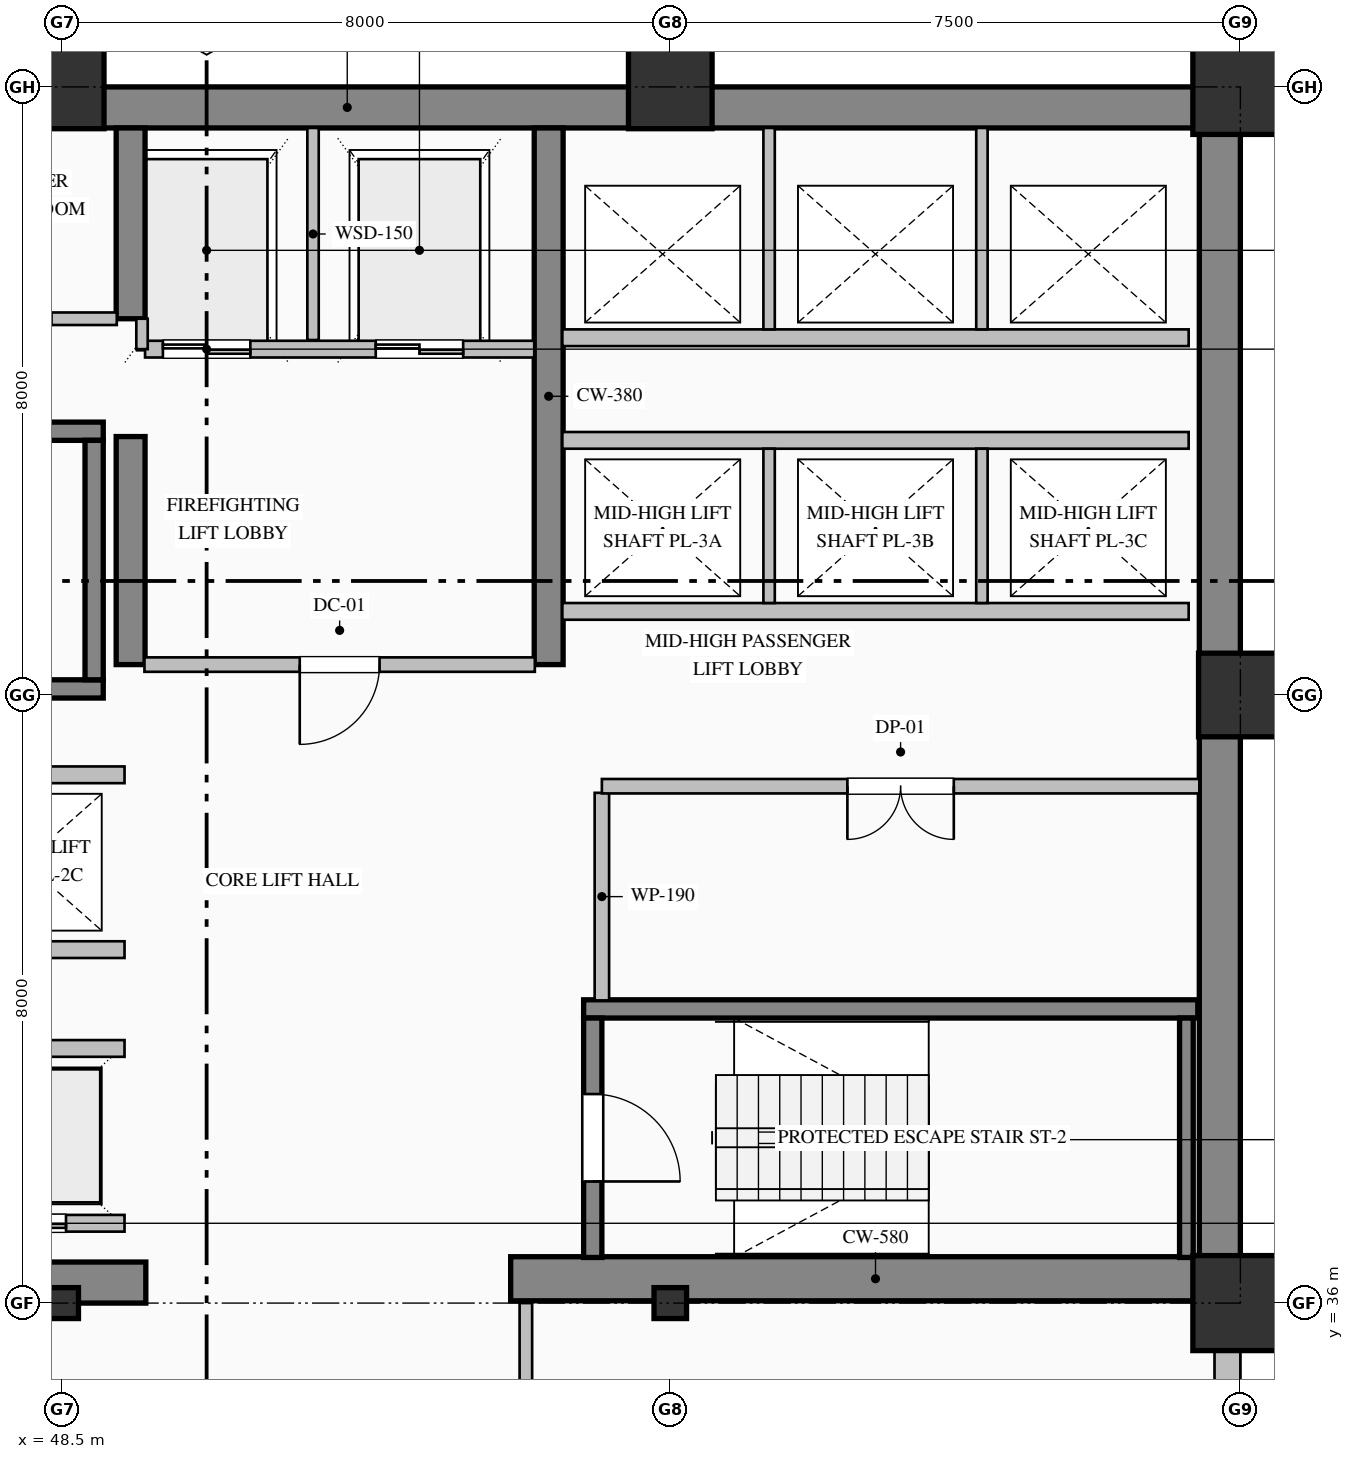
"""IFC4 building model, lengths in metres.
Left out: names, types, materials, properties, quantities, classifications, styles, units other than length and angle.
Written with IfcOpenShell. Run it as: python <this file> out.ifc"""

import sys

from ifc_helpers import new_model, si_unit, direction, frame, frame_2d, origin, origin_2d, place, context, subcontext, project, spatial, rectangle, hollow_rectangle, i_section, extrude, element, fill, save


model = new_model("IFC4")
c1 = context("Model", 3, precision=1e-05, world=origin(), true_north=direction((0.0, 1.0)))
c2 = subcontext(c1, "Body", "Model", "MODEL_VIEW")
j1 = project(units=[si_unit("LENGTHUNIT", "METRE"), si_unit("PLANEANGLEUNIT", "RADIAN")], contexts=[c1])
p1 = place(None, origin())
s1 = spatial("IfcSite", under=j1, at=p1, CompositionType="ELEMENT")
p2 = place(p1, origin())
s2 = spatial("IfcBuilding", under=s1, at=p2, CompositionType="ELEMENT")
p3 = place(p2, frame((0.0, 0.0, 56.2)))
s3 = spatial("IfcBuildingStorey", under=s2, at=p3, CompositionType="ELEMENT", Elevation=56.2)
p4 = place(p3, frame((40.5, 51.73, 0.0), z_axis=(0.0, 0.0, 1.0), x_axis=(1.0, 0.0, 0.0)))
e1 = element("IfcWall", 1, at=p4, inside=s3, PredefinedType="SHEAR", context=c2, shape_type="SweptSolid", body=[
    extrude(rectangle(XDim=23.5, YDim=0.54, at=frame_2d((11.75, 0.0))), origin(), (0.0, 0.0, 1.0), 3.75),
])
p5 = place(p3, frame((63.73, 36.32, 0.0), z_axis=(0.0, 0.0, 1.0), x_axis=(0.0, 1.0, 0.0)))
e2 = element("IfcWall", 2, at=p5, inside=s3, PredefinedType="SHEAR", context=c2, shape_type="SweptSolid", body=[
    extrude(rectangle(XDim=15.14, YDim=0.54, at=frame_2d((7.57, 0.0))), origin(), (0.0, 0.0, 1.0), 3.75),
])
p6 = place(p3, frame((48.2, 36.27, 0.0), z_axis=(0.0, 0.0, 1.0), x_axis=(1.0, 0.0, 0.0)))
e3 = element("IfcWall", 3, at=p6, inside=s3, PredefinedType="SHEAR", context=c2, shape_type="SweptSolid", body=[
    extrude(rectangle(XDim=1.4, YDim=0.54, at=frame_2d((0.7, 0.0))), origin(), (0.0, 0.0, 1.0), 3.75),
])
p7 = place(p3, frame((54.4, 36.32, 0.0), z_axis=(0.0, 0.0, 1.0), x_axis=(1.0, 0.0, 0.0)))
e4 = element("IfcWall", 4, at=p7, inside=s3, PredefinedType="SHEAR", context=c2, shape_type="SweptSolid", body=[
    extrude(rectangle(XDim=9.6, YDim=0.58, at=frame_2d((4.8, 0.0))), origin(), (0.0, 0.0, 1.0), 4.0),
])
p8 = place(p3, frame((49.4, 44.4, 0.0), z_axis=(0.0, 0.0, 1.0), x_axis=(0.0, 1.0, 0.0)))
e5 = element("IfcWall", 5, at=p8, inside=s3, PredefinedType="SHEAR", context=c2, shape_type="SweptSolid", body=[
    extrude(rectangle(XDim=3.0, YDim=0.38, at=frame_2d((1.5, 0.0))), origin(), (0.0, 0.0, 1.0), 3.75),
])
p9 = place(p3, frame((49.4, 48.95, 0.0), z_axis=(0.0, 0.0, 1.0), x_axis=(0.0, 1.0, 0.0)))
e6 = element("IfcWall", 6, at=p9, inside=s3, PredefinedType="SHEAR", context=c2, shape_type="SweptSolid", body=[
    extrude(rectangle(XDim=2.51, YDim=0.38, at=frame_2d((1.255, 0.0))), origin(), (0.0, 0.0, 1.0), 3.75),
])
p10 = place(p3, frame((54.9, 44.4, 0.0), z_axis=(0.0, 0.0, 1.0), x_axis=(0.0, 1.0, 0.0)))
e7 = element("IfcWall", 7, at=p10, inside=s3, PredefinedType="SHEAR", context=c2, shape_type="SweptSolid", body=[
    extrude(rectangle(XDim=7.06, YDim=0.38, at=frame_2d((3.53, 0.0))), origin(), (0.0, 0.0, 1.0), 3.75),
])
p11 = place(p3, frame((48.5, 36.0, 0.0), z_axis=(0.0, 0.0, 1.0), x_axis=(1.0, 0.0, 0.0)))
e8 = element("IfcColumn", 8, at=p11, inside=s3, PredefinedType="COLUMN", context=c2, shape_type="SweptSolid", body=[
    extrude(i_section(OverallWidth=0.407, OverallDepth=0.428, WebThickness=0.02, FlangeThickness=0.035, FilletRadius=0.022, at=origin_2d()), origin(), (0.0, 0.0, 1.0), 4.0),
])
p12 = place(p3, frame((48.5, 52.0, 0.0), z_axis=(0.0, 0.0, 1.0), x_axis=(1.0, 0.0, 0.0)))
e9 = element("IfcColumn", 9, at=p12, inside=s3, PredefinedType="COLUMN", context=c2, shape_type="SweptSolid", body=[
    extrude(hollow_rectangle(XDim=1.1, YDim=1.1, WallThickness=0.04, at=origin_2d()), origin(), (0.0, 0.0, 1.0), 4.0),
])
p13 = place(p3, frame((56.5, 36.0, 0.0), z_axis=(0.0, 0.0, 1.0), x_axis=(1.0, 0.0, 0.0)))
e10 = element("IfcColumn", 10, at=p13, inside=s3, PredefinedType="COLUMN", context=c2, shape_type="SweptSolid", body=[
    extrude(i_section(OverallWidth=0.407, OverallDepth=0.428, WebThickness=0.02, FlangeThickness=0.035, FilletRadius=0.022, at=origin_2d()), origin(), (0.0, 0.0, 1.0), 4.0),
])
p14 = place(p3, frame((56.5, 52.0, 0.0), z_axis=(0.0, 0.0, 1.0), x_axis=(1.0, 0.0, 0.0)))
e11 = element("IfcColumn", 11, at=p14, inside=s3, PredefinedType="COLUMN", context=c2, shape_type="SweptSolid", body=[
    extrude(hollow_rectangle(XDim=1.1, YDim=1.1, WallThickness=0.04, at=origin_2d()), origin(), (0.0, 0.0, 1.0), 4.0),
])
p15 = place(p3, frame((64.0, 36.0, 0.0), z_axis=(0.0, 0.0, 1.0), x_axis=(1.0, 0.0, 0.0)))
e12 = element("IfcColumn", 12, at=p15, inside=s3, PredefinedType="COLUMN", context=c2, shape_type="SweptSolid", body=[
    extrude(hollow_rectangle(XDim=1.25, YDim=1.25, WallThickness=0.045, at=origin_2d()), origin(), (0.0, 0.0, 1.0), 4.0),
])
p16 = place(p3, frame((64.0, 44.0, 0.0), z_axis=(0.0, 0.0, 1.0), x_axis=(1.0, 0.0, 0.0)))
e13 = element("IfcColumn", 13, at=p16, inside=s3, PredefinedType="COLUMN", context=c2, shape_type="SweptSolid", body=[
    extrude(hollow_rectangle(XDim=1.1, YDim=1.1, WallThickness=0.04, at=origin_2d()), origin(), (0.0, 0.0, 1.0), 4.0),
])
p17 = place(p3, frame((64.0, 52.0, 0.0), z_axis=(0.0, 0.0, 1.0), x_axis=(1.0, 0.0, 0.0)))
e14 = element("IfcColumn", 14, at=p17, inside=s3, PredefinedType="COLUMN", context=c2, shape_type="SweptSolid", body=[
    extrude(hollow_rectangle(XDim=1.25, YDim=1.25, WallThickness=0.045, at=origin_2d()), origin(), (0.0, 0.0, 1.0), 4.0),
])
p18 = place(p3, frame((63.83, 36.05, 0.0), z_axis=(0.0, 0.0, 1.0), x_axis=(0.0, -1.0, 0.0)))
e15 = element("IfcWall", 15, at=p18, inside=s3, PredefinedType="SOLIDWALL", context=c2, shape_type="SweptSolid", body=[
    extrude(rectangle(XDim=28.05, YDim=0.34, at=frame_2d((14.025, 0.0))), origin(), (0.0, 0.0, 1.0), 3.25),
])
p19 = place(p18, frame((2.55, 0.0, 0.85)))
e16 = element("IfcOpeningElement", 16, at=p19, cuts=e15, PredefinedType="OPENING", context=c2, shape_type="SweptSolid", body=[
    extrude(rectangle(XDim=2.1, YDim=2.05, at=frame_2d((1.05, 1.025))), frame((0.0, 0.18, 0.0), z_axis=(0.0, -1.0, 0.0), x_axis=(1.0, 0.0, 0.0)), (0.0, 0.0, 1.0), 0.36),
])
p20 = place(p18, frame((9.9, 0.0, 0.85)))
e17 = element("IfcOpeningElement", 17, at=p20, cuts=e15, PredefinedType="OPENING", context=c2, shape_type="SweptSolid", body=[
    extrude(rectangle(XDim=1.8, YDim=2.05, at=frame_2d((0.9, 1.025))), frame((0.0, 0.18, 0.0), z_axis=(0.0, -1.0, 0.0), x_axis=(1.0, 0.0, 0.0)), (0.0, 0.0, 1.0), 0.36),
])
for number, where, z_axis, x_axis in (
    (18, (40.96, 47.47, 0.0), (0.0, 0.0, 1.0), (1.0, 0.0, 0.0)),
    (19, (49.04, 44.08, 0.0), (0.0, 0.0, 1.0), (-1.0, 0.0, 0.0)),
):
    element("IfcWall", number, at=place(p3, frame(where, z_axis=z_axis, x_axis=x_axis)), inside=s3, PredefinedType="SOLIDWALL", context=c2, shape_type="SweptSolid", body=[
        extrude(rectangle(XDim=8.08, YDim=0.24, at=frame_2d((4.04, 0.0))), origin(), (0.0, 0.0, 1.0), 4.0),
    ])
p21 = place(p3, frame((48.92, 44.2, 0.0), z_axis=(0.0, 0.0, 1.0), x_axis=(0.0, 1.0, 0.0)))
e20 = element("IfcWall", 20, at=p21, inside=s3, PredefinedType="SOLIDWALL", context=c2, shape_type="SweptSolid", body=[
    extrude(rectangle(XDim=3.15, YDim=0.24, at=frame_2d((1.575, 0.0))), origin(), (0.0, 0.0, 1.0), 4.0),
])
p22 = place(p3, frame((55.36, 39.87, 0.0), z_axis=(0.0, 0.0, 1.0), x_axis=(1.0, 0.0, 0.0)))
e21 = element("IfcWall", 21, at=p22, inside=s3, PredefinedType="SOLIDWALL", context=c2, shape_type="SweptSolid", body=[
    extrude(rectangle(XDim=8.08, YDim=0.24, at=frame_2d((4.04, 0.0))), origin(), (0.0, 0.0, 1.0), 4.0),
])
p23 = place(p3, frame((55.48, 39.75, 0.0), z_axis=(0.0, 0.0, 1.0), x_axis=(0.0, -1.0, 0.0)))
e22 = element("IfcWall", 22, at=p23, inside=s3, PredefinedType="SOLIDWALL", context=c2, shape_type="SweptSolid", body=[
    extrude(rectangle(XDim=3.15, YDim=0.24, at=frame_2d((1.575, 0.0))), origin(), (0.0, 0.0, 1.0), 4.0),
])
p24 = place(p23, frame((1.0, 0.0, 0.0)))
e23 = element("IfcOpeningElement", 23, at=p24, cuts=e22, PredefinedType="OPENING", context=c2, shape_type="SweptSolid", body=[
    extrude(rectangle(XDim=1.15, YDim=2.2, at=frame_2d((0.575, 1.1))), frame((0.0, 0.13, 0.0), z_axis=(0.0, -1.0, 0.0), x_axis=(1.0, 0.0, 0.0)), (0.0, 0.0, 1.0), 0.26),
])
p25 = place(p3, frame((63.29, 36.6, 0.0), z_axis=(0.0, 0.0, 1.0), x_axis=(0.0, 1.0, 0.0)))
e24 = element("IfcWall", 24, at=p25, inside=s3, PredefinedType="SOLIDWALL", context=c2, shape_type="SweptSolid", body=[
    extrude(rectangle(XDim=3.15, YDim=0.18, at=frame_2d((1.575, 0.0))), origin(), (0.0, 0.0, 1.0), 4.0),
])
p26 = place(p3, frame((54.71, 48.55, 0.0), z_axis=(0.0, 0.0, 1.0), x_axis=(-1.0, 0.0, 0.0)))
e25 = element("IfcWall", 25, at=p26, inside=s3, PredefinedType="PARTITIONING", context=c2, shape_type="SweptSolid", body=[
    extrude(rectangle(XDim=5.12, YDim=0.22, at=frame_2d((2.56, 0.0))), origin(), (0.0, 0.0, 1.0), 3.75),
])
p27 = place(p26, frame((3.735, 0.0, 0.0)))
e26 = element("IfcOpeningElement", 26, at=p27, cuts=e25, PredefinedType="OPENING", context=c2, shape_type="SweptSolid", body=[
    extrude(rectangle(XDim=1.15, YDim=2.2, at=frame_2d((0.575, 1.1))), frame((0.0, 0.12, 0.0), z_axis=(0.0, -1.0, 0.0), x_axis=(1.0, 0.0, 0.0)), (0.0, 0.0, 1.0), 0.24),
])
p28 = place(p26, frame((0.935, 0.0, 0.0)))
e27 = element("IfcOpeningElement", 27, at=p28, cuts=e25, PredefinedType="OPENING", context=c2, shape_type="SweptSolid", body=[
    extrude(rectangle(XDim=1.15, YDim=2.2, at=frame_2d((0.575, 1.1))), frame((0.0, 0.12, 0.0), z_axis=(0.0, -1.0, 0.0), x_axis=(1.0, 0.0, 0.0)), (0.0, 0.0, 1.0), 0.24),
])
p29 = place(p3, frame((51.8, 48.67, 0.0), z_axis=(0.0, 0.0, 1.0), x_axis=(0.0, 1.0, 0.0)))
e28 = element("IfcWall", 28, at=p29, inside=s3, PredefinedType="PARTITIONING", context=c2, shape_type="SweptSolid", body=[
    extrude(rectangle(XDim=2.79, YDim=0.15, at=frame_2d((1.395, 0.0))), origin(), (0.0, 0.0, 1.0), 3.75),
])
p30 = place(p3, frame((49.55, 48.55, 0.0), z_axis=(0.0, 0.0, 1.0), x_axis=(0.0, 1.0, 0.0)))
e29 = element("IfcWall", 29, at=p30, inside=s3, PredefinedType="PARTITIONING", context=c2, shape_type="SweptSolid", body=[
    extrude(rectangle(XDim=0.4, YDim=0.15, at=frame_2d((0.2, 0.0))), origin(), (0.0, 0.0, 1.0), 3.75),
])
p31 = place(p3, frame((49.32, 37.05, 0.0), z_axis=(0.0, 0.0, 1.0), x_axis=(-1.0, 0.0, 0.0)))
e30 = element("IfcWall", 30, at=p31, inside=s3, PredefinedType="PARTITIONING", context=c2, shape_type="SweptSolid", body=[
    extrude(rectangle(XDim=8.24, YDim=0.22, at=frame_2d((4.12, 0.0))), origin(), (0.0, 0.0, 1.0), 3.75),
])
p32 = place(p31, frame((6.37, 0.0, 0.0)))
e31 = element("IfcOpeningElement", 31, at=p32, cuts=e30, PredefinedType="OPENING", context=c2, shape_type="SweptSolid", body=[
    extrude(rectangle(XDim=1.1, YDim=2.2, at=frame_2d((0.55, 1.1))), frame((0.0, 0.12, 0.0), z_axis=(0.0, -1.0, 0.0), x_axis=(1.0, 0.0, 0.0)), (0.0, 0.0, 1.0), 0.24),
])
p33 = place(p31, frame((3.57, 0.0, 0.0)))
e32 = element("IfcOpeningElement", 32, at=p33, cuts=e30, PredefinedType="OPENING", context=c2, shape_type="SweptSolid", body=[
    extrude(rectangle(XDim=1.1, YDim=2.2, at=frame_2d((0.55, 1.1))), frame((0.0, 0.12, 0.0), z_axis=(0.0, -1.0, 0.0), x_axis=(1.0, 0.0, 0.0)), (0.0, 0.0, 1.0), 0.24),
])
p34 = place(p31, frame((0.77, 0.0, 0.0)))
e33 = element("IfcOpeningElement", 33, at=p34, cuts=e30, PredefinedType="OPENING", context=c2, shape_type="SweptSolid", body=[
    extrude(rectangle(XDim=1.1, YDim=2.2, at=frame_2d((0.55, 1.1))), frame((0.0, 0.12, 0.0), z_axis=(0.0, -1.0, 0.0), x_axis=(1.0, 0.0, 0.0)), (0.0, 0.0, 1.0), 0.24),
])
for number, where, z_axis, x_axis in (
    (34, (41.08, 39.35, 0.0), (0.0, 0.0, 1.0), (1.0, 0.0, 0.0)),
    (35, (49.32, 40.65, 0.0), (0.0, 0.0, 1.0), (-1.0, 0.0, 0.0)),
    (36, (41.08, 42.95, 0.0), (0.0, 0.0, 1.0), (1.0, 0.0, 0.0)),
    (37, (63.32, 45.1, 0.0), (0.0, 0.0, 1.0), (-1.0, 0.0, 0.0)),
    (38, (55.08, 47.35, 0.0), (0.0, 0.0, 1.0), (1.0, 0.0, 0.0)),
):
    element("IfcWall", number, at=place(p3, frame(where, z_axis=z_axis, x_axis=x_axis)), inside=s3, PredefinedType="PARTITIONING", context=c2, shape_type="SweptSolid", body=[
        extrude(rectangle(XDim=8.24, YDim=0.22, at=frame_2d((4.12, 0.0))), origin(), (0.0, 0.0, 1.0), 3.75),
    ])
for number, where, z_axis, x_axis in (
    (39, (57.8, 45.21, 0.0), (0.0, 0.0, 1.0), (0.0, 1.0, 0.0)),
    (40, (60.6, 45.21, 0.0), (0.0, 0.0, 1.0), (0.0, 1.0, 0.0)),
):
    element("IfcWall", number, at=place(p3, frame(where, z_axis=z_axis, x_axis=x_axis)), inside=s3, PredefinedType="PARTITIONING", context=c2, shape_type="SweptSolid", body=[
        extrude(rectangle(XDim=2.03, YDim=0.15, at=frame_2d((1.015, 0.0))), origin(), (0.0, 0.0, 1.0), 3.75),
    ])
p35 = place(p3, frame((63.32, 48.7, 0.0), z_axis=(0.0, 0.0, 1.0), x_axis=(-1.0, 0.0, 0.0)))
e41 = element("IfcWall", 41, at=p35, inside=s3, PredefinedType="PARTITIONING", context=c2, shape_type="SweptSolid", body=[
    extrude(rectangle(XDim=8.24, YDim=0.22, at=frame_2d((4.12, 0.0))), origin(), (0.0, 0.0, 1.0), 3.75),
])
for number, where, z_axis, x_axis in (
    (42, (57.8, 48.81, 0.0), (0.0, 0.0, 1.0), (0.0, 1.0, 0.0)),
    (43, (60.6, 48.81, 0.0), (0.0, 0.0, 1.0), (0.0, 1.0, 0.0)),
):
    element("IfcWall", number, at=place(p3, frame(where, z_axis=z_axis, x_axis=x_axis)), inside=s3, PredefinedType="PARTITIONING", context=c2, shape_type="SweptSolid", body=[
        extrude(rectangle(XDim=2.65, YDim=0.15, at=frame_2d((1.325, 0.0))), origin(), (0.0, 0.0, 1.0), 3.75),
    ])
p36 = place(p3, frame((46.6, 48.95, 0.0), z_axis=(0.0, 0.0, 1.0), x_axis=(1.0, 0.0, 0.0)))
e44 = element("IfcWall", 44, at=p36, inside=s3, PredefinedType="PARTITIONING", context=c2, shape_type="SweptSolid", body=[
    extrude(rectangle(XDim=2.618, YDim=0.165, at=frame_2d((1.309, 0.0))), origin(), (0.0, 0.0, 1.0), 3.75),
])
p37 = place(p36, frame((0.859, 0.0, 0.0)))
e45 = element("IfcOpeningElement", 45, at=p37, cuts=e44, PredefinedType="OPENING", context=c2, shape_type="SweptSolid", body=[
    extrude(rectangle(XDim=0.9, YDim=2.15, at=frame_2d((0.45, 1.075))), frame((0.0, 0.093, 0.0), z_axis=(0.0, -1.0, 0.0), x_axis=(1.0, 0.0, 0.0)), (0.0, 0.0, 1.0), 0.185),
])
p38 = place(p3, frame((54.718, 44.4, 0.0), z_axis=(0.0, 0.0, 1.0), x_axis=(-1.0, 0.0, 0.0)))
e46 = element("IfcWall", 46, at=p38, inside=s3, PredefinedType="PARTITIONING", context=c2, shape_type="SweptSolid", body=[
    extrude(rectangle(XDim=5.136, YDim=0.19, at=frame_2d((2.568, 0.0))), origin(), (0.0, 0.0, 1.0), 3.75),
])
p39 = place(p38, frame((2.043, 0.0, 0.0)))
e47 = element("IfcOpeningElement", 47, at=p39, cuts=e46, PredefinedType="OPENING", context=c2, shape_type="SweptSolid", body=[
    extrude(rectangle(XDim=1.05, YDim=2.15, at=frame_2d((0.525, 1.075))), frame((0.0, 0.105, 0.0), z_axis=(0.0, -1.0, 0.0), x_axis=(1.0, 0.0, 0.0)), (0.0, 0.0, 1.0), 0.21),
])
p40 = place(p3, frame((55.6, 42.713, 0.0), z_axis=(0.0, 0.0, 1.0), x_axis=(0.0, -1.0, 0.0)))
e48 = element("IfcWall", 48, at=p40, inside=s3, PredefinedType="PARTITIONING", context=c2, shape_type="SweptSolid", body=[
    extrude(rectangle(XDim=2.731, YDim=0.19, at=frame_2d((1.365, 0.0))), origin(), (0.0, 0.0, 1.0), 3.75),
])
p41 = place(p3, frame((63.46, 42.8, 0.0), z_axis=(0.0, 0.0, 1.0), x_axis=(-1.0, 0.0, 0.0)))
e49 = element("IfcWall", 49, at=p41, inside=s3, PredefinedType="PARTITIONING", context=c2, shape_type="SweptSolid", body=[
    extrude(rectangle(XDim=7.86, YDim=0.19, at=frame_2d((3.93, 0.0))), origin(), (0.0, 0.0, 1.0), 3.75),
])
p42 = place(p41, frame((3.23, 0.0, 0.0)))
e50 = element("IfcOpeningElement", 50, at=p42, cuts=e49, PredefinedType="OPENING", context=c2, shape_type="SweptSolid", body=[
    extrude(rectangle(XDim=1.4, YDim=2.25, at=frame_2d((0.7, 1.125))), frame((0.0, 0.105, 0.0), z_axis=(0.0, -1.0, 0.0), x_axis=(1.0, 0.0, 0.0)), (0.0, 0.0, 1.0), 0.21),
])
p43 = place(p3, frame((54.6, 36.0, 0.0), z_axis=(0.0, 0.0, 1.0), x_axis=(0.0, -1.0, 0.0)))
e51 = element("IfcWall", 51, at=p43, inside=s3, PredefinedType="PARTITIONING", context=c2, shape_type="SweptSolid", body=[
    extrude(rectangle(XDim=2.125, YDim=0.165, at=frame_2d((1.063, 0.0))), origin(), (0.0, 0.0, 1.0), 3.75),
])
p44 = place(p24, origin())
e52 = element("IfcDoor", 52, at=p44, inside=s3, OperationType="SINGLE_SWING_RIGHT", PredefinedType="DOOR", context=c2, shape_type="SweptSolid", body=[
    extrude(rectangle(XDim=1.15, YDim=2.2, at=frame_2d((0.575, 1.1))), frame((0.0, 0.025, 0.0), z_axis=(0.0, -1.0, 0.0), x_axis=(1.0, 0.0, 0.0)), (0.0, 0.0, 1.0), 0.05),
])
fill(e23, e52)
p45 = place(p27, origin())
e53 = element("IfcDoor", 53, at=p45, inside=s3, OperationType="DOUBLE_DOOR_SLIDING", PredefinedType="DOOR", context=c2, shape_type="SweptSolid", body=[
    extrude(rectangle(XDim=1.15, YDim=2.2, at=frame_2d((0.575, 1.1))), frame((0.0, 0.025, 0.0), z_axis=(0.0, -1.0, 0.0), x_axis=(1.0, 0.0, 0.0)), (0.0, 0.0, 1.0), 0.05),
])
fill(e26, e53)
p46 = place(p28, origin())
e54 = element("IfcDoor", 54, at=p46, inside=s3, OperationType="DOUBLE_DOOR_SLIDING", PredefinedType="DOOR", context=c2, shape_type="SweptSolid", body=[
    extrude(rectangle(XDim=1.15, YDim=2.2, at=frame_2d((0.575, 1.1))), frame((0.0, 0.025, 0.0), z_axis=(0.0, -1.0, 0.0), x_axis=(1.0, 0.0, 0.0)), (0.0, 0.0, 1.0), 0.05),
])
fill(e27, e54)
p47 = place(p34, origin())
e55 = element("IfcDoor", 55, at=p47, inside=s3, OperationType="DOUBLE_DOOR_SLIDING", PredefinedType="DOOR", context=c2, shape_type="SweptSolid", body=[
    extrude(rectangle(XDim=1.1, YDim=2.2, at=frame_2d((0.55, 1.1))), frame((0.0, 0.025, 0.0), z_axis=(0.0, -1.0, 0.0), x_axis=(1.0, 0.0, 0.0)), (0.0, 0.0, 1.0), 0.05),
])
fill(e33, e55)
p48 = place(p39, origin())
e56 = element("IfcDoor", 56, at=p48, inside=s3, OperationType="SINGLE_SWING_RIGHT", PredefinedType="DOOR", context=c2, shape_type="SweptSolid", body=[
    extrude(rectangle(XDim=1.05, YDim=2.15, at=frame_2d((0.525, 1.075))), frame((0.0, 0.025, 0.0), z_axis=(0.0, -1.0, 0.0), x_axis=(1.0, 0.0, 0.0)), (0.0, 0.0, 1.0), 0.05),
])
fill(e47, e56)
p49 = place(p42, origin())
e57 = element("IfcDoor", 57, at=p49, inside=s3, OperationType="DOUBLE_DOOR_SINGLE_SWING", PredefinedType="DOOR", context=c2, shape_type="SweptSolid", body=[
    extrude(rectangle(XDim=1.4, YDim=2.25, at=frame_2d((0.7, 1.125))), frame((0.0, 0.025, 0.0), z_axis=(0.0, -1.0, 0.0), x_axis=(1.0, 0.0, 0.0)), (0.0, 0.0, 1.0), 0.05),
])
fill(e50, e57)
save(model, sys.argv[1])
